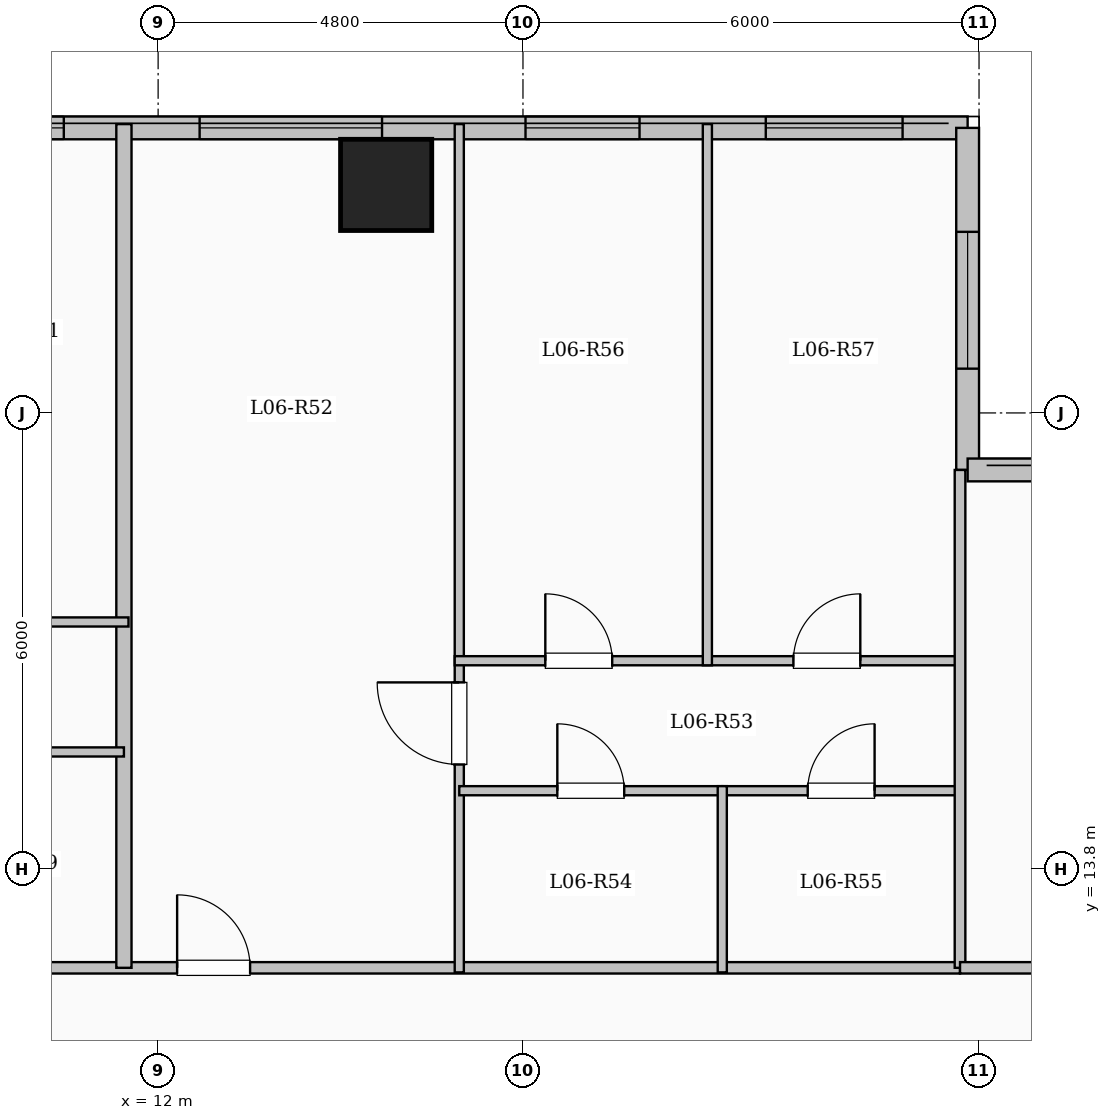
"""IFC4 building model, lengths in metres.
Left out: names, types, materials, properties, quantities, classifications, styles, units other than length and angle.
Written with IfcOpenShell. Run it as: python <this file> out.ifc"""

import sys

from ifc_helpers import new_model, si_unit, direction, frame, frame_2d, origin, origin_2d, place, context, subcontext, project, spatial, rectangle, extrude, element, fill, save


model = new_model("IFC4")
c1 = context("Model", 3, precision=1e-05, world=origin(), true_north=direction((0.0, 1.0)))
c2 = subcontext(c1, "Body", "Model", "MODEL_VIEW")
j1 = project(units=[si_unit("LENGTHUNIT", "METRE"), si_unit("PLANEANGLEUNIT", "RADIAN")], contexts=[c1])
p1 = place(None, origin())
s1 = spatial("IfcSite", under=j1, at=p1, CompositionType="ELEMENT")
p2 = place(p1, origin())
s2 = spatial("IfcBuilding", under=s1, at=p2, CompositionType="ELEMENT")
p3 = place(p2, frame((0.0, 0.0, 27.35)))
s3 = spatial("IfcBuildingStorey", under=s2, at=p3, CompositionType="ELEMENT", Elevation=27.35)
p4 = place(p3, frame((15.0, 22.8, 0.0), z_axis=(0.0, 0.0, 1.0), x_axis=(1.0, 0.0, 0.0)))
e1 = element("IfcColumn", 1, at=p4, inside=s3, PredefinedType="COLUMN", context=c2, shape_type="SweptSolid", body=[
    extrude(rectangle(XDim=1.2, YDim=1.2, at=origin_2d()), origin(), (0.0, 0.0, 1.0), 3.35),
])
p5 = place(p3, frame((7.35, 23.55, 0.0), z_axis=(0.0, 0.0, 1.0), x_axis=(1.0, 0.0, 0.0)))
e2 = element("IfcWall", 2, at=p5, inside=s3, PredefinedType="SOLIDWALL", context=c2, shape_type="SweptSolid", body=[
    extrude(rectangle(XDim=15.3, YDim=0.3, at=frame_2d((7.65, 0.0))), origin(), (0.0, 0.0, 1.0), 3.1),
])
p6 = place(p5, frame((0.205, 0.0, 0.95)))
e3 = element("IfcOpeningElement", 3, at=p6, cuts=e2, PredefinedType="OPENING", context=c2, shape_type="SweptSolid", body=[
    extrude(rectangle(XDim=0.85, YDim=1.5, at=frame_2d((0.425, 0.75))), frame((0.0, 0.16, 0.0), z_axis=(0.0, -1.0, 0.0), x_axis=(1.0, 0.0, 0.0)), (0.0, 0.0, 1.0), 0.32),
])
p7 = place(p5, frame((2.209, 0.0, 0.95)))
e4 = element("IfcOpeningElement", 4, at=p7, cuts=e2, PredefinedType="OPENING", context=c2, shape_type="SweptSolid", body=[
    extrude(rectangle(XDim=1.2, YDim=1.5, at=frame_2d((0.6, 0.75))), frame((0.0, 0.16, 0.0), z_axis=(0.0, -1.0, 0.0), x_axis=(1.0, 0.0, 0.0)), (0.0, 0.0, 1.0), 0.32),
])
p8 = place(p5, frame((5.196, 0.0, 0.9)))
e5 = element("IfcOpeningElement", 5, at=p8, cuts=e2, PredefinedType="OPENING", context=c2, shape_type="SweptSolid", body=[
    extrude(rectangle(XDim=2.4, YDim=1.8, at=frame_2d((1.2, 0.9))), frame((0.0, 0.16, 0.0), z_axis=(0.0, -1.0, 0.0), x_axis=(1.0, 0.0, 0.0)), (0.0, 0.0, 1.0), 0.32),
])
p9 = place(p5, frame((9.483, 0.0, 0.9)))
e6 = element("IfcOpeningElement", 6, at=p9, cuts=e2, PredefinedType="OPENING", context=c2, shape_type="SweptSolid", body=[
    extrude(rectangle(XDim=1.5, YDim=1.65, at=frame_2d((0.75, 0.825))), frame((0.0, 0.16, 0.0), z_axis=(0.0, -1.0, 0.0), x_axis=(1.0, 0.0, 0.0)), (0.0, 0.0, 1.0), 0.32),
])
p10 = place(p5, frame((12.644, 0.0, 0.9)))
e7 = element("IfcOpeningElement", 7, at=p10, cuts=e2, PredefinedType="OPENING", context=c2, shape_type="SweptSolid", body=[
    extrude(rectangle(XDim=1.8, YDim=1.65, at=frame_2d((0.9, 0.825))), frame((0.0, 0.16, 0.0), z_axis=(0.0, -1.0, 0.0), x_axis=(1.0, 0.0, 0.0)), (0.0, 0.0, 1.0), 0.32),
])
p11 = place(p3, frame((22.65, 23.55, 0.0), z_axis=(0.0, 0.0, 1.0), x_axis=(0.0, -1.0, 0.0)))
e8 = element("IfcWall", 8, at=p11, inside=s3, PredefinedType="SOLIDWALL", context=c2, shape_type="SweptSolid", body=[
    extrude(rectangle(XDim=4.5, YDim=0.3, at=frame_2d((2.25, 0.0))), origin(), (0.0, 0.0, 1.0), 3.1),
])
p12 = place(p11, frame((1.367, 0.0, 0.9)))
e9 = element("IfcOpeningElement", 9, at=p12, cuts=e8, PredefinedType="OPENING", context=c2, shape_type="SweptSolid", body=[
    extrude(rectangle(XDim=1.8, YDim=1.65, at=frame_2d((0.9, 0.825))), frame((0.0, 0.16, 0.0), z_axis=(0.0, -1.0, 0.0), x_axis=(1.0, 0.0, 0.0)), (0.0, 0.0, 1.0), 0.32),
])
p13 = place(p3, frame((22.65, 19.05, 0.0), z_axis=(0.0, 0.0, 1.0), x_axis=(1.0, 0.0, 0.0)))
e10 = element("IfcWall", 10, at=p13, inside=s3, PredefinedType="SOLIDWALL", context=c2, shape_type="SweptSolid", body=[
    extrude(rectangle(XDim=6.0, YDim=0.3, at=frame_2d((3.0, 0.0))), origin(), (0.0, 0.0, 1.0), 3.1),
])
p14 = place(p13, frame((1.975, 0.0, 0.9)))
e11 = element("IfcOpeningElement", 11, at=p14, cuts=e10, PredefinedType="OPENING", context=c2, shape_type="SweptSolid", body=[
    extrude(rectangle(XDim=2.0, YDim=1.7, at=frame_2d((1.0, 0.85))), frame((0.0, 0.16, 0.0), z_axis=(0.0, -1.0, 0.0), x_axis=(1.0, 0.0, 0.0)), (0.0, 0.0, 1.0), 0.32),
])
p15 = place(p3, frame((3.85, 12.5, 0.0), z_axis=(0.0, 0.0, 1.0), x_axis=(1.0, 0.0, 0.0)))
e12 = element("IfcWall", 12, at=p15, inside=s3, PredefinedType="PARTITIONING", context=c2, shape_type="SweptSolid", body=[
    extrude(rectangle(XDim=18.7, YDim=0.15, at=frame_2d((9.35, 0.0))), origin(), (0.0, 0.0, 1.0), 3.1),
])
p16 = place(p15, frame((0.7, 0.0, 0.0)))
e13 = element("IfcOpeningElement", 13, at=p16, cuts=e12, PredefinedType="OPENING", context=c2, shape_type="SweptSolid", body=[
    extrude(rectangle(XDim=0.96, YDim=2.15, at=frame_2d((0.48, 1.075))), frame((0.0, 0.085, 0.0), z_axis=(0.0, -1.0, 0.0), x_axis=(1.0, 0.0, 0.0)), (0.0, 0.0, 1.0), 0.17),
])
p17 = place(p15, frame((8.4, 0.0, 0.0)))
e14 = element("IfcOpeningElement", 14, at=p17, cuts=e12, PredefinedType="OPENING", context=c2, shape_type="SweptSolid", body=[
    extrude(rectangle(XDim=0.96, YDim=2.15, at=frame_2d((0.48, 1.075))), frame((0.0, 0.085, 0.0), z_axis=(0.0, -1.0, 0.0), x_axis=(1.0, 0.0, 0.0)), (0.0, 0.0, 1.0), 0.17),
])
p18 = place(p3, frame((11.55, 12.5, 0.0), z_axis=(0.0, 0.0, 1.0), x_axis=(0.0, 1.0, 0.0)))
e15 = element("IfcWall", 15, at=p18, inside=s3, PredefinedType="SOLIDWALL", context=c2, shape_type="SweptSolid", body=[
    extrude(rectangle(XDim=11.1, YDim=0.2, at=frame_2d((5.55, 0.0))), origin(), (0.0, 0.0, 1.0), 3.1),
])
p19 = place(p3, frame((8.716, 15.34, 0.0), z_axis=(0.0, 0.0, 1.0), x_axis=(1.0, 0.0, 0.0)))
e16 = element("IfcWall", 16, at=p19, inside=s3, PredefinedType="PARTITIONING", context=c2, shape_type="SweptSolid", body=[
    extrude(rectangle(XDim=2.834, YDim=0.12, at=frame_2d((1.417, 0.0))), origin(), (0.0, 0.0, 1.0), 3.1),
])
p20 = place(p19, frame((0.977, 0.0, 0.0)))
e17 = element("IfcOpeningElement", 17, at=p20, cuts=e16, PredefinedType="OPENING", context=c2, shape_type="SweptSolid", body=[
    extrude(rectangle(XDim=0.88, YDim=2.1, at=frame_2d((0.44, 1.05))), frame((0.0, 0.07, 0.0), z_axis=(0.0, -1.0, 0.0), x_axis=(1.0, 0.0, 0.0)), (0.0, 0.0, 1.0), 0.14),
])
p21 = place(p3, frame((5.99, 17.05, 0.0), z_axis=(0.0, 0.0, 1.0), x_axis=(1.0, 0.0, 0.0)))
e18 = element("IfcWall", 18, at=p21, inside=s3, PredefinedType="PARTITIONING", context=c2, shape_type="SweptSolid", body=[
    extrude(rectangle(XDim=5.62, YDim=0.12, at=frame_2d((2.81, 0.0))), origin(), (0.0, 0.0, 1.0), 3.1),
])
p22 = place(p21, frame((0.92, 0.0, 0.0)))
e19 = element("IfcOpeningElement", 19, at=p22, cuts=e18, PredefinedType="OPENING", context=c2, shape_type="SweptSolid", body=[
    extrude(rectangle(XDim=0.88, YDim=2.1, at=frame_2d((0.44, 1.05))), frame((0.0, 0.07, 0.0), z_axis=(0.0, -1.0, 0.0), x_axis=(1.0, 0.0, 0.0)), (0.0, 0.0, 1.0), 0.14),
])
p23 = place(p21, frame((3.64, 0.0, 0.0)))
e20 = element("IfcOpeningElement", 20, at=p23, cuts=e18, PredefinedType="OPENING", context=c2, shape_type="SweptSolid", body=[
    extrude(rectangle(XDim=0.88, YDim=2.1, at=frame_2d((0.44, 1.05))), frame((0.0, 0.07, 0.0), z_axis=(0.0, -1.0, 0.0), x_axis=(1.0, 0.0, 0.0)), (0.0, 0.0, 1.0), 0.14),
])
p24 = place(p3, frame((15.962, 12.44, 0.0), z_axis=(0.0, 0.0, 1.0), x_axis=(0.0, 1.0, 0.0)))
e21 = element("IfcWall", 21, at=p24, inside=s3, PredefinedType="PARTITIONING", context=c2, shape_type="SweptSolid", body=[
    extrude(rectangle(XDim=11.16, YDim=0.12, at=frame_2d((5.58, 0.0))), origin(), (0.0, 0.0, 1.0), 3.1),
])
p25 = place(p24, frame((2.735, 0.0, 0.0)))
e22 = element("IfcOpeningElement", 22, at=p25, cuts=e21, PredefinedType="OPENING", context=c2, shape_type="SweptSolid", body=[
    extrude(rectangle(XDim=1.08, YDim=2.15, at=frame_2d((0.54, 1.075))), frame((0.0, 0.07, 0.0), z_axis=(0.0, -1.0, 0.0), x_axis=(1.0, 0.0, 0.0)), (0.0, 0.0, 1.0), 0.14),
])
p26 = place(p3, frame((15.962, 14.83, 0.0), z_axis=(0.0, 0.0, 1.0), x_axis=(1.0, 0.0, 0.0)))
e23 = element("IfcWall", 23, at=p26, inside=s3, PredefinedType="PARTITIONING", context=c2, shape_type="SweptSolid", body=[
    extrude(rectangle(XDim=3.46, YDim=0.12, at=frame_2d((1.73, 0.0))), origin(), (0.0, 0.0, 1.0), 3.1),
])
p27 = place(p26, frame((1.29, 0.0, 0.0)))
e24 = element("IfcOpeningElement", 24, at=p27, cuts=e23, PredefinedType="OPENING", context=c2, shape_type="SweptSolid", body=[
    extrude(rectangle(XDim=0.88, YDim=2.1, at=frame_2d((0.44, 1.05))), frame((0.0, 0.07, 0.0), z_axis=(0.0, -1.0, 0.0), x_axis=(1.0, 0.0, 0.0)), (0.0, 0.0, 1.0), 0.14),
])
p28 = place(p3, frame((19.422, 14.83, 0.0), z_axis=(0.0, 0.0, 1.0), x_axis=(1.0, 0.0, 0.0)))
e25 = element("IfcWall", 25, at=p28, inside=s3, PredefinedType="PARTITIONING", context=c2, shape_type="SweptSolid", body=[
    extrude(rectangle(XDim=3.128, YDim=0.12, at=frame_2d((1.564, 0.0))), origin(), (0.0, 0.0, 1.0), 3.1),
])
p29 = place(p28, frame((1.124, 0.0, 0.0)))
e26 = element("IfcOpeningElement", 26, at=p29, cuts=e25, PredefinedType="OPENING", context=c2, shape_type="SweptSolid", body=[
    extrude(rectangle(XDim=0.88, YDim=2.1, at=frame_2d((0.44, 1.05))), frame((0.0, 0.07, 0.0), z_axis=(0.0, -1.0, 0.0), x_axis=(1.0, 0.0, 0.0)), (0.0, 0.0, 1.0), 0.14),
])
p30 = place(p3, frame((15.902, 16.54, 0.0), z_axis=(0.0, 0.0, 1.0), x_axis=(1.0, 0.0, 0.0)))
e27 = element("IfcWall", 27, at=p30, inside=s3, PredefinedType="PARTITIONING", context=c2, shape_type="SweptSolid", body=[
    extrude(rectangle(XDim=6.708, YDim=0.12, at=frame_2d((3.354, 0.0))), origin(), (0.0, 0.0, 1.0), 3.1),
])
p31 = place(p30, frame((1.192, 0.0, 0.0)))
e28 = element("IfcOpeningElement", 28, at=p31, cuts=e27, PredefinedType="OPENING", context=c2, shape_type="SweptSolid", body=[
    extrude(rectangle(XDim=0.88, YDim=2.1, at=frame_2d((0.44, 1.05))), frame((0.0, 0.07, 0.0), z_axis=(0.0, -1.0, 0.0), x_axis=(1.0, 0.0, 0.0)), (0.0, 0.0, 1.0), 0.14),
])
p32 = place(p30, frame((4.456, 0.0, 0.0)))
e29 = element("IfcOpeningElement", 29, at=p32, cuts=e27, PredefinedType="OPENING", context=c2, shape_type="SweptSolid", body=[
    extrude(rectangle(XDim=0.88, YDim=2.1, at=frame_2d((0.44, 1.05))), frame((0.0, 0.07, 0.0), z_axis=(0.0, -1.0, 0.0), x_axis=(1.0, 0.0, 0.0)), (0.0, 0.0, 1.0), 0.14),
])
p33 = place(p3, frame((19.422, 12.44, 0.0), z_axis=(0.0, 0.0, 1.0), x_axis=(0.0, 1.0, 0.0)))
e30 = element("IfcWall", 30, at=p33, inside=s3, PredefinedType="PARTITIONING", context=c2, shape_type="SweptSolid", body=[
    extrude(rectangle(XDim=2.45, YDim=0.12, at=frame_2d((1.225, 0.0))), origin(), (0.0, 0.0, 1.0), 3.1),
])
p34 = place(p3, frame((19.226, 16.48, 0.0), z_axis=(0.0, 0.0, 1.0), x_axis=(0.0, 1.0, 0.0)))
e31 = element("IfcWall", 31, at=p34, inside=s3, PredefinedType="PARTITIONING", context=c2, shape_type="SweptSolid", body=[
    extrude(rectangle(XDim=7.12, YDim=0.12, at=frame_2d((3.56, 0.0))), origin(), (0.0, 0.0, 1.0), 3.1),
])
p35 = place(p3, frame((22.55, 12.5, 0.0), z_axis=(0.0, 0.0, 1.0), x_axis=(0.0, 1.0, 0.0)))
e32 = element("IfcWall", 32, at=p35, inside=s3, PredefinedType="PARTITIONING", context=c2, shape_type="SweptSolid", body=[
    extrude(rectangle(XDim=6.55, YDim=0.14, at=frame_2d((3.275, 0.0))), origin(), (0.0, 0.0, 1.0), 3.1),
])
p36 = place(p3, frame((22.55, 12.5, 0.0), z_axis=(0.0, 0.0, 1.0), x_axis=(1.0, 0.0, 0.0)))
e33 = element("IfcWall", 33, at=p36, inside=s3, PredefinedType="PARTITIONING", context=c2, shape_type="SweptSolid", body=[
    extrude(rectangle(XDim=6.13, YDim=0.15, at=frame_2d((3.065, 0.0))), origin(), (0.0, 0.0, 1.0), 3.1),
])
p37 = place(p36, frame((2.59, 0.0, 0.0)))
e34 = element("IfcOpeningElement", 34, at=p37, cuts=e33, PredefinedType="OPENING", context=c2, shape_type="SweptSolid", body=[
    extrude(rectangle(XDim=0.95, YDim=2.15, at=frame_2d((0.475, 1.075))), frame((0.0, 0.085, 0.0), z_axis=(0.0, -1.0, 0.0), x_axis=(1.0, 0.0, 0.0)), (0.0, 0.0, 1.0), 0.17),
])
p38 = place(p7, origin())
e35 = element("IfcWindow", 35, at=p38, inside=s3, PartitioningType="SINGLE_PANEL", PredefinedType="WINDOW", context=c2, shape_type="SweptSolid", body=[
    extrude(rectangle(XDim=1.2, YDim=1.5, at=frame_2d((0.6, 0.75))), frame((0.0, 0.03, 0.0), z_axis=(0.0, -1.0, 0.0), x_axis=(1.0, 0.0, 0.0)), (0.0, 0.0, 1.0), 0.06),
])
fill(e4, e35)
p39 = place(p8, origin())
e36 = element("IfcWindow", 36, at=p39, inside=s3, PartitioningType="SINGLE_PANEL", PredefinedType="WINDOW", context=c2, shape_type="SweptSolid", body=[
    extrude(rectangle(XDim=2.4, YDim=1.8, at=frame_2d((1.2, 0.9))), frame((0.0, 0.03, 0.0), z_axis=(0.0, -1.0, 0.0), x_axis=(1.0, 0.0, 0.0)), (0.0, 0.0, 1.0), 0.06),
])
fill(e5, e36)
p40 = place(p9, origin())
e37 = element("IfcWindow", 37, at=p40, inside=s3, PartitioningType="SINGLE_PANEL", PredefinedType="WINDOW", context=c2, shape_type="SweptSolid", body=[
    extrude(rectangle(XDim=1.5, YDim=1.65, at=frame_2d((0.75, 0.825))), frame((0.0, 0.03, 0.0), z_axis=(0.0, -1.0, 0.0), x_axis=(1.0, 0.0, 0.0)), (0.0, 0.0, 1.0), 0.06),
])
fill(e6, e37)
p41 = place(p10, origin())
e38 = element("IfcWindow", 38, at=p41, inside=s3, PartitioningType="SINGLE_PANEL", PredefinedType="WINDOW", context=c2, shape_type="SweptSolid", body=[
    extrude(rectangle(XDim=1.8, YDim=1.65, at=frame_2d((0.9, 0.825))), frame((0.0, 0.03, 0.0), z_axis=(0.0, -1.0, 0.0), x_axis=(1.0, 0.0, 0.0)), (0.0, 0.0, 1.0), 0.06),
])
fill(e7, e38)
p42 = place(p12, origin())
e39 = element("IfcWindow", 39, at=p42, inside=s3, PartitioningType="SINGLE_PANEL", PredefinedType="WINDOW", context=c2, shape_type="SweptSolid", body=[
    extrude(rectangle(XDim=1.8, YDim=1.65, at=frame_2d((0.9, 0.825))), frame((0.0, 0.03, 0.0), z_axis=(0.0, -1.0, 0.0), x_axis=(1.0, 0.0, 0.0)), (0.0, 0.0, 1.0), 0.06),
])
fill(e9, e39)
p43 = place(p17, origin())
e40 = element("IfcDoor", 40, at=p43, inside=s3, OperationType="SINGLE_SWING_LEFT", PredefinedType="DOOR", context=c2, shape_type="SweptSolid", body=[
    extrude(rectangle(XDim=0.96, YDim=2.15, at=frame_2d((0.48, 1.075))), frame((0.0, 0.025, 0.0), z_axis=(0.0, -1.0, 0.0), x_axis=(1.0, 0.0, 0.0)), (0.0, 0.0, 1.0), 0.05),
])
fill(e14, e40)
p44 = place(p25, origin())
e41 = element("IfcDoor", 41, at=p44, inside=s3, OperationType="SINGLE_SWING_RIGHT", PredefinedType="DOOR", context=c2, shape_type="SweptSolid", body=[
    extrude(rectangle(XDim=1.08, YDim=2.15, at=frame_2d((0.54, 1.075))), frame((0.0, 0.025, 0.0), z_axis=(0.0, -1.0, 0.0), x_axis=(1.0, 0.0, 0.0)), (0.0, 0.0, 1.0), 0.05),
])
fill(e22, e41)
p45 = place(p27, origin())
e42 = element("IfcDoor", 42, at=p45, inside=s3, OperationType="SINGLE_SWING_LEFT", PredefinedType="DOOR", context=c2, shape_type="SweptSolid", body=[
    extrude(rectangle(XDim=0.88, YDim=2.1, at=frame_2d((0.44, 1.05))), frame((0.0, 0.025, 0.0), z_axis=(0.0, -1.0, 0.0), x_axis=(1.0, 0.0, 0.0)), (0.0, 0.0, 1.0), 0.05),
])
fill(e24, e42)
p46 = place(p29, origin())
e43 = element("IfcDoor", 43, at=p46, inside=s3, OperationType="SINGLE_SWING_RIGHT", PredefinedType="DOOR", context=c2, shape_type="SweptSolid", body=[
    extrude(rectangle(XDim=0.88, YDim=2.1, at=frame_2d((0.44, 1.05))), frame((0.0, 0.025, 0.0), z_axis=(0.0, -1.0, 0.0), x_axis=(1.0, 0.0, 0.0)), (0.0, 0.0, 1.0), 0.05),
])
fill(e26, e43)
p47 = place(p31, origin())
e44 = element("IfcDoor", 44, at=p47, inside=s3, OperationType="SINGLE_SWING_LEFT", PredefinedType="DOOR", context=c2, shape_type="SweptSolid", body=[
    extrude(rectangle(XDim=0.88, YDim=2.1, at=frame_2d((0.44, 1.05))), frame((0.0, 0.025, 0.0), z_axis=(0.0, -1.0, 0.0), x_axis=(1.0, 0.0, 0.0)), (0.0, 0.0, 1.0), 0.05),
])
fill(e28, e44)
p48 = place(p32, origin())
e45 = element("IfcDoor", 45, at=p48, inside=s3, OperationType="SINGLE_SWING_RIGHT", PredefinedType="DOOR", context=c2, shape_type="SweptSolid", body=[
    extrude(rectangle(XDim=0.88, YDim=2.1, at=frame_2d((0.44, 1.05))), frame((0.0, 0.025, 0.0), z_axis=(0.0, -1.0, 0.0), x_axis=(1.0, 0.0, 0.0)), (0.0, 0.0, 1.0), 0.05),
])
fill(e29, e45)
save(model, sys.argv[1])
